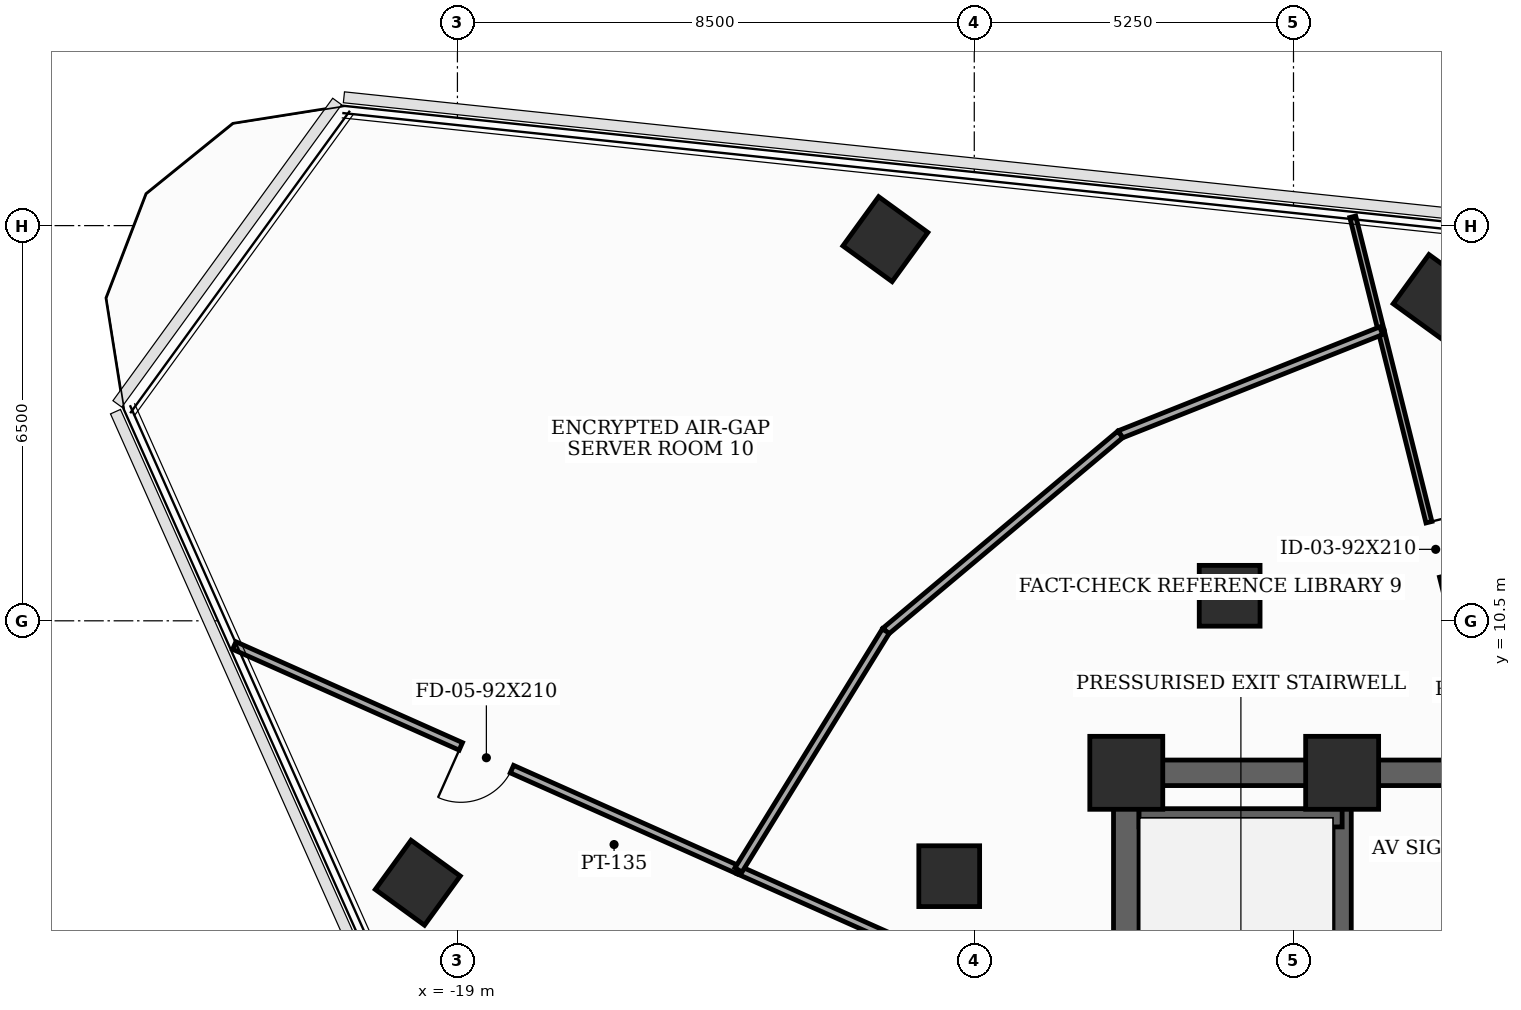
"""IFC4 building model, lengths in metres.
Left out: names, types, materials, properties, quantities, classifications, styles, units other than length and angle.
Written with IfcOpenShell. Run it as: python <this file> out.ifc"""

import sys

from ifc_helpers import new_model, si_unit, direction, frame, frame_2d, origin, origin_2d, place, context, subcontext, project, spatial, rectangle, extrude, element, fill, save


model = new_model("IFC4")
c1 = context("Model", 3, precision=1e-05, world=origin(), true_north=direction((0.0, 1.0)))
c2 = subcontext(c1, "Body", "Model", "MODEL_VIEW")
j1 = project(units=[si_unit("LENGTHUNIT", "METRE"), si_unit("PLANEANGLEUNIT", "RADIAN")], contexts=[c1])
p1 = place(None, origin())
s1 = spatial("IfcSite", under=j1, at=p1, CompositionType="ELEMENT")
p2 = place(p1, origin())
s2 = spatial("IfcBuilding", under=s1, at=p2, CompositionType="ELEMENT")
p3 = place(p2, frame((0.0, 0.0, 233.7)))
s3 = spatial("IfcBuildingStorey", under=s2, at=p3, CompositionType="ELEMENT", Elevation=233.7)
for number, where, z_axis, x_axis in (
    (1, (-4.45, 8.0, 0.0), (0.0, 0.0, 1.0), (1.0, 0.0, 0.0)),
    (2, (-8.0, 8.0, 0.0), (0.0, 0.0, 1.0), (1.0, 0.0, 0.0)),
):
    element("IfcColumn", number, at=place(p3, frame(where, z_axis=z_axis, x_axis=x_axis)), inside=s3, PredefinedType="COLUMN", context=c2, shape_type="SweptSolid", body=[
        extrude(rectangle(XDim=1.2, YDim=1.2, at=origin_2d()), origin(), (0.0, 0.0, 1.0), 3.7),
    ])
for number, where, z_axis, x_axis in (
    (3, (-6.3, 10.912, 0.0), (0.0, 0.0, 1.0), (1.0, 0.0, 0.0)),
    (4, (-10.912, 6.3, 0.0), (0.0, 0.0, 1.0), (1.0, 0.0, 0.0)),
    (5, (-2.912, 15.826, 0.0), (0.0, 0.0, 1.0), (0.588, 0.809, 0.0)),
    (6, (-11.962, 16.777, 0.0), (0.0, 0.0, 1.0), (0.588, 0.809, 0.0)),
    (7, (-19.652, 6.192, 0.0), (0.0, 0.0, 1.0), (0.588, 0.809, 0.0)),
):
    element("IfcColumn", number, at=place(p3, frame(where, z_axis=z_axis, x_axis=x_axis)), inside=s3, PredefinedType="COLUMN", context=c2, shape_type="SweptSolid", body=[
        extrude(rectangle(XDim=1.0, YDim=1.0, at=origin_2d()), origin(), (0.0, 0.0, 1.0), 3.7),
    ])
p4 = place(p3, frame((-8.0, -8.0, 0.0), z_axis=(0.0, 0.0, 1.0), x_axis=(0.0, 1.0, 0.0)))
e8 = element("IfcWall", 8, at=p4, inside=s3, PredefinedType="SHEAR", context=c2, shape_type="SweptSolid", body=[
    extrude(rectangle(XDim=16.0, YDim=0.42, at=frame_2d((8.0, 0.0))), origin(), (0.0, 0.0, 1.0), 3.5),
])
p5 = place(p4, frame((0.761, 0.0, 0.0)))
e9 = element("IfcOpeningElement", 9, at=p5, cuts=e8, PredefinedType="OPENING", context=c2, shape_type="SweptSolid", body=[
    extrude(rectangle(XDim=0.85, YDim=2.02, at=frame_2d((0.425, 1.01))), frame((0.0, 0.22, 0.0), z_axis=(0.0, -1.0, 0.0), x_axis=(1.0, 0.0, 0.0)), (0.0, 0.0, 1.0), 0.44),
])
p6 = place(p4, frame((5.35, 0.0, 0.0)))
e10 = element("IfcOpeningElement", 10, at=p6, cuts=e8, PredefinedType="OPENING", context=c2, shape_type="SweptSolid", body=[
    extrude(rectangle(XDim=1.05, YDim=2.15, at=frame_2d((0.525, 1.075))), frame((0.0, 0.22, 0.0), z_axis=(0.0, -1.0, 0.0), x_axis=(1.0, 0.0, 0.0)), (0.0, 0.0, 1.0), 0.44),
])
p7 = place(p3, frame((-8.0, 8.0, 0.0), z_axis=(0.0, 0.0, 1.0), x_axis=(1.0, 0.0, 0.0)))
e11 = element("IfcWall", 11, at=p7, inside=s3, PredefinedType="SHEAR", context=c2, shape_type="SweptSolid", body=[
    extrude(rectangle(XDim=16.0, YDim=0.42, at=frame_2d((8.0, 0.0))), origin(), (0.0, 0.0, 1.0), 3.5),
])
p8 = place(p7, frame((7.1, 0.0, 0.0)))
e12 = element("IfcOpeningElement", 12, at=p8, cuts=e11, PredefinedType="OPENING", context=c2, shape_type="SweptSolid", body=[
    extrude(rectangle(XDim=1.8, YDim=2.15, at=frame_2d((0.9, 1.075))), frame((0.0, 0.22, 0.0), z_axis=(0.0, -1.0, 0.0), x_axis=(1.0, 0.0, 0.0)), (0.0, 0.0, 1.0), 0.44),
])
p9 = place(p3, frame((-4.45, -7.79, 0.0), z_axis=(0.0, 0.0, 1.0), x_axis=(0.0, 1.0, 0.0)))
e13 = element("IfcWall", 13, at=p9, inside=s3, PredefinedType="SHEAR", context=c2, shape_type="SweptSolid", body=[
    extrude(rectangle(XDim=15.58, YDim=0.3, at=frame_2d((7.79, 0.0))), origin(), (0.0, 0.0, 1.0), 3.5),
])
p10 = place(p3, frame((-7.79, 7.26, 0.0), z_axis=(0.0, 0.0, 1.0), x_axis=(1.0, 0.0, 0.0)))
e14 = element("IfcWall", 14, at=p10, inside=s3, PredefinedType="SHEAR", context=c2, shape_type="SweptSolid", body=[
    extrude(rectangle(XDim=3.34, YDim=0.3, at=frame_2d((1.67, 0.0))), origin(), (0.0, 0.0, 1.0), 3.5),
])
p11 = place(p3, frame((-8.08, 3.597, 0.0), z_axis=(0.0, 0.0, 1.0), x_axis=(-0.913494385598, 0.40685133339, 0.0)))
e15 = element("IfcWall", 15, at=p11, inside=s3, PredefinedType="PARTITIONING", context=c2, shape_type="SweptSolid", body=[
    extrude(rectangle(XDim=6.894, YDim=0.135, at=frame_2d((3.447, 0.0))), origin(), (0.0, 0.0, 1.0), 2.885),
])
p12 = place(p3, frame((-14.378, 6.402, 0.0), z_axis=(0.0, 0.0, 1.0), x_axis=(-0.913562917951, 0.406697424315, 0.0)))
e16 = element("IfcWall", 16, at=p12, inside=s3, PredefinedType="PARTITIONING", context=c2, shape_type="SweptSolid", body=[
    extrude(rectangle(XDim=9.077, YDim=0.135, at=frame_2d((4.538, 0.0))), origin(), (0.0, 0.0, 1.0), 2.985),
])
p13 = place(p12, frame((4.078, 0.0, 0.0)))
e17 = element("IfcOpeningElement", 17, at=p13, cuts=e16, PredefinedType="OPENING", context=c2, shape_type="SweptSolid", body=[
    extrude(rectangle(XDim=0.92, YDim=2.1, at=frame_2d((0.46, 1.05))), frame((0.0, 0.077, 0.0), z_axis=(0.0, -1.0, 0.0), x_axis=(1.0, 0.0, 0.0)), (0.0, 0.0, 1.0), 0.155),
])
p14 = place(p3, frame((-3.808, 15.271, 0.0), z_axis=(0.0, 0.0, 1.0), x_axis=(0.241993010569, -0.970277992555, 0.0)))
e18 = element("IfcWall", 18, at=p14, inside=s3, PredefinedType="MOVABLE", context=c2, shape_type="SweptSolid", body=[
    extrude(rectangle(XDim=7.411, YDim=0.1, at=frame_2d((3.706, 0.0))), origin(), (0.0, 0.0, 1.0), 2.885),
])
p15 = place(p14, frame((3.246, 0.0, 0.0)))
e19 = element("IfcOpeningElement", 19, at=p15, cuts=e18, PredefinedType="OPENING", context=c2, shape_type="SweptSolid", body=[
    extrude(rectangle(XDim=0.92, YDim=2.1, at=frame_2d((0.46, 1.05))), frame((0.0, 0.06, 0.0), z_axis=(0.0, -1.0, 0.0), x_axis=(1.0, 0.0, 0.0)), (0.0, 0.0, 1.0), 0.12),
])
p16 = place(p3, frame((-4.275, 17.146, 0.0), z_axis=(0.0, 0.0, 1.0), x_axis=(0.241881394388, -0.970305823464, 0.0)))
e20 = element("IfcWall", 20, at=p16, inside=s3, PredefinedType="MOVABLE", context=c2, shape_type="SweptSolid", body=[
    extrude(rectangle(XDim=1.932, YDim=0.1, at=frame_2d((0.966, 0.0))), origin(), (0.0, 0.0, 1.0), 3.035),
])
p17 = place(p3, frame((-3.808, 15.271, 0.0), z_axis=(0.0, 0.0, 1.0), x_axis=(-0.929356809345, -0.369182774414, 0.0)))
e21 = element("IfcWall", 21, at=p17, inside=s3, PredefinedType="PARTITIONING", context=c2, shape_type="SweptSolid", body=[
    extrude(rectangle(XDim=4.616, YDim=0.135, at=frame_2d((2.308, 0.0))), origin(), (0.0, 0.0, 1.0), 3.5),
])
p18 = place(p3, frame((-8.098, 13.567, 0.0), z_axis=(0.0, 0.0, 1.0), x_axis=(-0.766114520239, -0.642704085781, 0.0)))
e22 = element("IfcWall", 22, at=p18, inside=s3, PredefinedType="PARTITIONING", context=c2, shape_type="SweptSolid", body=[
    extrude(rectangle(XDim=5.035, YDim=0.135, at=frame_2d((2.517, 0.0))), origin(), (0.0, 0.0, 1.0), 2.985),
])
p19 = place(p3, frame((-11.955, 10.331, 0.0), z_axis=(0.0, 0.0, 1.0), x_axis=(-0.524888064347, -0.851171263557, 0.0)))
e23 = element("IfcWall", 23, at=p19, inside=s3, PredefinedType="PARTITIONING", context=c2, shape_type="SweptSolid", body=[
    extrude(rectangle(XDim=4.616, YDim=0.135, at=frame_2d((2.308, 0.0))), origin(), (0.0, 0.0, 1.0), 2.985),
])
p20 = place(p13, origin())
e24 = element("IfcDoor", 24, at=p20, inside=s3, OperationType="SINGLE_SWING_RIGHT", PredefinedType="DOOR", context=c2, shape_type="SweptSolid", body=[
    extrude(rectangle(XDim=0.92, YDim=2.1, at=frame_2d((0.46, 1.05))), frame((0.0, 0.025, 0.0), z_axis=(0.0, -1.0, 0.0), x_axis=(1.0, 0.0, 0.0)), (0.0, 0.0, 1.0), 0.05),
])
fill(e17, e24)
p21 = place(p15, origin())
e25 = element("IfcDoor", 25, at=p21, inside=s3, OperationType="SINGLE_SWING_LEFT", PredefinedType="DOOR", context=c2, shape_type="SweptSolid", body=[
    extrude(rectangle(XDim=0.92, YDim=2.1, at=frame_2d((0.46, 1.05))), frame((0.0, 0.025, 0.0), z_axis=(0.0, -1.0, 0.0), x_axis=(1.0, 0.0, 0.0)), (0.0, 0.0, 1.0), 0.05),
])
fill(e19, e25)
save(model, sys.argv[1])
